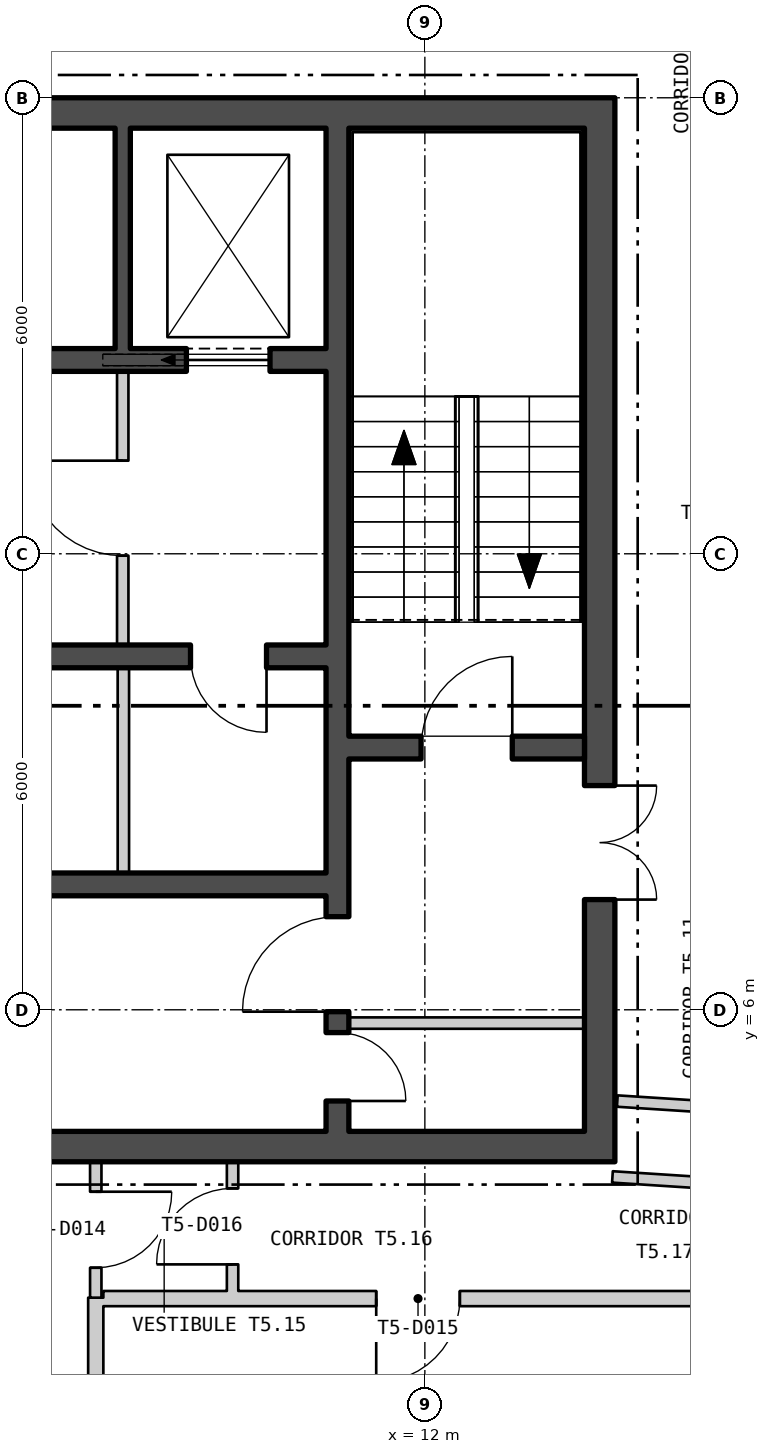
"""IFC4 building model, lengths in metres.
Left out: names, types, materials, properties, quantities, classifications, styles, units other than length and angle.
Written with IfcOpenShell. Run it as: python <this file> out.ifc"""

import sys

from ifc_helpers import new_model, si_unit, direction, frame, frame_2d, origin, place, context, subcontext, project, spatial, polyline, rectangle, outline, extrude, element, fill, save


model = new_model("IFC4")
c1 = context("Model", 3, precision=1e-05, world=origin(), true_north=direction((0.0, 1.0)))
c2 = subcontext(c1, "Body", "Model", "MODEL_VIEW")
j1 = project(units=[si_unit("LENGTHUNIT", "METRE"), si_unit("PLANEANGLEUNIT", "RADIAN")], contexts=[c1])
p1 = place(None, origin())
s1 = spatial("IfcSite", under=j1, at=p1, CompositionType="ELEMENT")
p2 = place(p1, origin())
s2 = spatial("IfcBuilding", under=s1, at=p2, CompositionType="ELEMENT")
p3 = place(p2, frame((0.0, 0.0, 292.2)))
s3 = spatial("IfcBuildingStorey", under=s2, at=p3, CompositionType="ELEMENT", Elevation=292.2)
p4 = place(p3, frame((14.048, -3.663, -0.18), z_axis=(0.0, 0.0, 1.0), x_axis=(0.500002580931, 0.866023913678, 0.0)))
e1 = element("IfcWall", 1, at=p4, inside=s3, PredefinedType="SOLIDWALL", context=c2, shape_type="SweptSolid", body=[
    extrude(outline(polyline([(0.0, -0.225), (22.595, -0.225), (22.335, 0.225), (0.0, 0.225), (0.0, -0.225)])), origin(), (0.0, 0.0, 1.0), 5.9),
])
p5 = place(p4, frame((0.653, 0.0, 1.38)))
e2 = element("IfcOpeningElement", 2, at=p5, cuts=e1, PredefinedType="OPENING", context=c2, shape_type="SweptSolid", body=[
    extrude(rectangle(XDim=2.4, YDim=3.6, at=frame_2d((1.2, 1.8))), frame((0.0, 0.235, 0.0), z_axis=(0.0, -1.0, 0.0), x_axis=(1.0, 0.0, 0.0)), (0.0, 0.0, 1.0), 0.47),
])
p6 = place(p4, frame((5.16, 0.0, 1.38)))
e3 = element("IfcOpeningElement", 3, at=p6, cuts=e1, PredefinedType="OPENING", context=c2, shape_type="SweptSolid", body=[
    extrude(rectangle(XDim=2.4, YDim=3.6, at=frame_2d((1.2, 1.8))), frame((0.0, 0.235, 0.0), z_axis=(0.0, -1.0, 0.0), x_axis=(1.0, 0.0, 0.0)), (0.0, 0.0, 1.0), 0.47),
])
p7 = place(p4, frame((9.667, 0.0, 1.38)))
e4 = element("IfcOpeningElement", 4, at=p7, cuts=e1, PredefinedType="OPENING", context=c2, shape_type="SweptSolid", body=[
    extrude(rectangle(XDim=2.4, YDim=3.6, at=frame_2d((1.2, 1.8))), frame((0.0, 0.235, 0.0), z_axis=(0.0, -1.0, 0.0), x_axis=(1.0, 0.0, 0.0)), (0.0, 0.0, 1.0), 0.47),
])
p8 = place(p4, frame((14.173, 0.0, 1.38)))
e5 = element("IfcOpeningElement", 5, at=p8, cuts=e1, PredefinedType="OPENING", context=c2, shape_type="SweptSolid", body=[
    extrude(rectangle(XDim=2.4, YDim=3.6, at=frame_2d((1.2, 1.8))), frame((0.0, 0.235, 0.0), z_axis=(0.0, -1.0, 0.0), x_axis=(1.0, 0.0, 0.0)), (0.0, 0.0, 1.0), 0.47),
])
p9 = place(p4, frame((18.641, 0.0, 1.38)))
e6 = element("IfcOpeningElement", 6, at=p9, cuts=e1, PredefinedType="OPENING", context=c2, shape_type="SweptSolid", body=[
    extrude(rectangle(XDim=2.4, YDim=3.6, at=frame_2d((1.2, 1.8))), frame((0.0, 0.235, 0.0), z_axis=(0.0, -1.0, 0.0), x_axis=(1.0, 0.0, 0.0)), (0.0, 0.0, 1.0), 0.47),
])
p10 = place(p3, frame((-14.5, 4.2, 0.0), z_axis=(0.0, 0.0, 1.0), x_axis=(1.0, 0.0, 0.0)))
e7 = element("IfcWall", 7, at=p10, inside=s3, PredefinedType="SHEAR", context=c2, shape_type="SweptSolid", body=[
    extrude(rectangle(XDim=29.0, YDim=0.4, at=frame_2d((14.5, 0.0))), origin(), (0.0, 0.0, 1.0), 5.7),
])
p11 = place(p10, frame((9.0, 0.0, 0.0)))
e8 = element("IfcOpeningElement", 8, at=p11, cuts=e7, PredefinedType="OPENING", context=c2, shape_type="SweptSolid", body=[
    extrude(rectangle(XDim=1.8, YDim=2.4, at=frame_2d((0.9, 1.2))), frame((0.0, 0.21, 0.0), z_axis=(0.0, -1.0, 0.0), x_axis=(1.0, 0.0, 0.0)), (0.0, 0.0, 1.0), 0.42),
])
p12 = place(p10, frame((19.0, 0.0, 0.0)))
e9 = element("IfcOpeningElement", 9, at=p12, cuts=e7, PredefinedType="OPENING", context=c2, shape_type="SweptSolid", body=[
    extrude(rectangle(XDim=1.8, YDim=2.4, at=frame_2d((0.9, 1.2))), frame((0.0, 0.21, 0.0), z_axis=(0.0, -1.0, 0.0), x_axis=(1.0, 0.0, 0.0)), (0.0, 0.0, 1.0), 0.42),
])
p13 = place(p3, frame((-14.5, 17.8, 0.0), z_axis=(0.0, 0.0, 1.0), x_axis=(1.0, 0.0, 0.0)))
e10 = element("IfcWall", 10, at=p13, inside=s3, PredefinedType="SHEAR", context=c2, shape_type="SweptSolid", body=[
    extrude(rectangle(XDim=29.0, YDim=0.4, at=frame_2d((14.5, 0.0))), origin(), (0.0, 0.0, 1.0), 5.7),
])
p14 = place(p3, frame((14.3, 4.4, 0.0), z_axis=(0.0, 0.0, 1.0), x_axis=(0.0, 1.0, 0.0)))
e11 = element("IfcWall", 11, at=p14, inside=s3, PredefinedType="SHEAR", context=c2, shape_type="SweptSolid", body=[
    extrude(rectangle(XDim=13.2, YDim=0.4, at=frame_2d((6.6, 0.0))), origin(), (0.0, 0.0, 1.0), 5.7),
])
p15 = place(p14, frame((3.05, 0.0, 0.0)))
e12 = element("IfcOpeningElement", 12, at=p15, cuts=e11, PredefinedType="OPENING", context=c2, shape_type="SweptSolid", body=[
    extrude(rectangle(XDim=1.5, YDim=2.1, at=frame_2d((0.75, 1.05))), frame((0.0, 0.21, 0.0), z_axis=(0.0, -1.0, 0.0), x_axis=(1.0, 0.0, 0.0)), (0.0, 0.0, 1.0), 0.42),
])
p16 = place(p3, frame((10.85, 4.4, 0.0), z_axis=(0.0, 0.0, 1.0), x_axis=(0.0, 1.0, 0.0)))
e13 = element("IfcWall", 13, at=p16, inside=s3, PredefinedType="SHEAR", context=c2, shape_type="SweptSolid", body=[
    extrude(rectangle(XDim=13.2, YDim=0.3, at=frame_2d((6.6, 0.0))), origin(), (0.0, 0.0, 1.0), 5.7),
])
p17 = place(p16, frame((1.575, 0.0, 0.0)))
e14 = element("IfcOpeningElement", 14, at=p17, cuts=e13, PredefinedType="OPENING", context=c2, shape_type="SweptSolid", body=[
    extrude(rectangle(XDim=1.25, YDim=2.1, at=frame_2d((0.625, 1.05))), frame((0.0, 0.16, 0.0), z_axis=(0.0, -1.0, 0.0), x_axis=(1.0, 0.0, 0.0)), (0.0, 0.0, 1.0), 0.32),
])
p18 = place(p16, frame((0.4, 0.0, 0.0)))
e15 = element("IfcOpeningElement", 15, at=p18, cuts=e13, PredefinedType="OPENING", context=c2, shape_type="SweptSolid", body=[
    extrude(rectangle(XDim=0.9, YDim=2.1, at=frame_2d((0.45, 1.05))), frame((0.0, 0.16, 0.0), z_axis=(0.0, -1.0, 0.0), x_axis=(1.0, 0.0, 0.0)), (0.0, 0.0, 1.0), 0.32),
])
p19 = place(p3, frame((11.0, 9.45, 0.0), z_axis=(0.0, 0.0, 1.0), x_axis=(1.0, 0.0, 0.0)))
e16 = element("IfcWall", 16, at=p19, inside=s3, PredefinedType="SHEAR", context=c2, shape_type="SweptSolid", body=[
    extrude(rectangle(XDim=3.1, YDim=0.3, at=frame_2d((1.55, 0.0))), origin(), (0.0, 0.0, 1.0), 5.7),
])
p20 = place(p19, frame((0.95, 0.0, 0.0)))
e17 = element("IfcOpeningElement", 17, at=p20, cuts=e16, PredefinedType="OPENING", context=c2, shape_type="SweptSolid", body=[
    extrude(rectangle(XDim=1.2, YDim=2.1, at=frame_2d((0.6, 1.05))), frame((0.0, 0.16, 0.0), z_axis=(0.0, -1.0, 0.0), x_axis=(1.0, 0.0, 0.0)), (0.0, 0.0, 1.0), 0.32),
])
p21 = place(p3, frame((-10.7, 14.55, 0.0), z_axis=(0.0, 0.0, 1.0), x_axis=(1.0, 0.0, 0.0)))
e18 = element("IfcWall", 18, at=p21, inside=s3, PredefinedType="SHEAR", context=c2, shape_type="SweptSolid", body=[
    extrude(rectangle(XDim=21.4, YDim=0.3, at=frame_2d((10.7, 0.0))), origin(), (0.0, 0.0, 1.0), 5.7),
])
p22 = place(p21, frame((0.738, 0.0, 0.0)))
e19 = element("IfcOpeningElement", 19, at=p22, cuts=e18, PredefinedType="OPENING", context=c2, shape_type="SweptSolid", body=[
    extrude(rectangle(XDim=1.1, YDim=2.1, at=frame_2d((0.55, 1.05))), frame((0.0, 0.16, 0.0), z_axis=(0.0, -1.0, 0.0), x_axis=(1.0, 0.0, 0.0)), (0.0, 0.0, 1.0), 0.32),
])
p23 = place(p21, frame((3.462, 0.0, 0.0)))
e20 = element("IfcOpeningElement", 20, at=p23, cuts=e18, PredefinedType="OPENING", context=c2, shape_type="SweptSolid", body=[
    extrude(rectangle(XDim=1.1, YDim=2.1, at=frame_2d((0.55, 1.05))), frame((0.0, 0.16, 0.0), z_axis=(0.0, -1.0, 0.0), x_axis=(1.0, 0.0, 0.0)), (0.0, 0.0, 1.0), 0.32),
])
p24 = place(p21, frame((6.138, 0.0, 0.0)))
e21 = element("IfcOpeningElement", 21, at=p24, cuts=e18, PredefinedType="OPENING", context=c2, shape_type="SweptSolid", body=[
    extrude(rectangle(XDim=1.1, YDim=2.1, at=frame_2d((0.55, 1.05))), frame((0.0, 0.16, 0.0), z_axis=(0.0, -1.0, 0.0), x_axis=(1.0, 0.0, 0.0)), (0.0, 0.0, 1.0), 0.32),
])
p25 = place(p21, frame((8.812, 0.0, 0.0)))
e22 = element("IfcOpeningElement", 22, at=p25, cuts=e18, PredefinedType="OPENING", context=c2, shape_type="SweptSolid", body=[
    extrude(rectangle(XDim=1.1, YDim=2.1, at=frame_2d((0.55, 1.05))), frame((0.0, 0.16, 0.0), z_axis=(0.0, -1.0, 0.0), x_axis=(1.0, 0.0, 0.0)), (0.0, 0.0, 1.0), 0.32),
])
p26 = place(p21, frame((19.562, 0.0, 0.0)))
e23 = element("IfcOpeningElement", 23, at=p26, cuts=e18, PredefinedType="OPENING", context=c2, shape_type="SweptSolid", body=[
    extrude(rectangle(XDim=1.1, YDim=2.1, at=frame_2d((0.55, 1.05))), frame((0.0, 0.16, 0.0), z_axis=(0.0, -1.0, 0.0), x_axis=(1.0, 0.0, 0.0)), (0.0, 0.0, 1.0), 0.32),
])
p27 = place(p21, frame((11.537, 0.0, 0.0)))
e24 = element("IfcOpeningElement", 24, at=p27, cuts=e18, PredefinedType="OPENING", context=c2, shape_type="SweptSolid", body=[
    extrude(rectangle(XDim=1.0, YDim=2.1, at=frame_2d((0.5, 1.05))), frame((0.0, 0.16, 0.0), z_axis=(0.0, -1.0, 0.0), x_axis=(1.0, 0.0, 0.0)), (0.0, 0.0, 1.0), 0.32),
])
p28 = place(p21, frame((15.55, 0.0, 0.0)))
e25 = element("IfcOpeningElement", 25, at=p28, cuts=e18, PredefinedType="OPENING", context=c2, shape_type="SweptSolid", body=[
    extrude(rectangle(XDim=1.0, YDim=2.1, at=frame_2d((0.5, 1.05))), frame((0.0, 0.16, 0.0), z_axis=(0.0, -1.0, 0.0), x_axis=(1.0, 0.0, 0.0)), (0.0, 0.0, 1.0), 0.32),
])
p29 = place(p3, frame((2.6, 10.65, 0.0), z_axis=(0.0, 0.0, 1.0), x_axis=(1.0, 0.0, 0.0)))
e26 = element("IfcWall", 26, at=p29, inside=s3, PredefinedType="SHEAR", context=c2, shape_type="SweptSolid", body=[
    extrude(rectangle(XDim=8.1, YDim=0.3, at=frame_2d((4.05, 0.0))), origin(), (0.0, 0.0, 1.0), 5.7),
])
p30 = place(p29, frame((2.267, 0.0, 0.0)))
e27 = element("IfcOpeningElement", 27, at=p30, cuts=e26, PredefinedType="OPENING", context=c2, shape_type="SweptSolid", body=[
    extrude(rectangle(XDim=1.0, YDim=2.1, at=frame_2d((0.5, 1.05))), frame((0.0, 0.16, 0.0), z_axis=(0.0, -1.0, 0.0), x_axis=(1.0, 0.0, 0.0)), (0.0, 0.0, 1.0), 0.32),
])
p31 = place(p29, frame((6.317, 0.0, 0.0)))
e28 = element("IfcOpeningElement", 28, at=p31, cuts=e26, PredefinedType="OPENING", context=c2, shape_type="SweptSolid", body=[
    extrude(rectangle(XDim=1.0, YDim=2.1, at=frame_2d((0.5, 1.05))), frame((0.0, 0.16, 0.0), z_axis=(0.0, -1.0, 0.0), x_axis=(1.0, 0.0, 0.0)), (0.0, 0.0, 1.0), 0.32),
])
p32 = place(p3, frame((2.6, 7.65, 0.0), z_axis=(0.0, 0.0, 1.0), x_axis=(1.0, 0.0, 0.0)))
e29 = element("IfcWall", 29, at=p32, inside=s3, PredefinedType="SHEAR", context=c2, shape_type="SweptSolid", body=[
    extrude(rectangle(XDim=8.1, YDim=0.3, at=frame_2d((4.05, 0.0))), origin(), (0.0, 0.0, 1.0), 5.7),
])
p33 = place(p3, frame((8.025, 14.7, 0.0), z_axis=(0.0, 0.0, 1.0), x_axis=(0.0, 1.0, 0.0)))
e30 = element("IfcWall", 30, at=p33, inside=s3, PredefinedType="SHEAR", context=c2, shape_type="SweptSolid", body=[
    extrude(rectangle(XDim=2.9, YDim=0.2, at=frame_2d((1.45, 0.0))), origin(), (0.0, 0.0, 1.0), 5.7),
])
p34 = place(p3, frame((8.033, 7.8, 0.0), z_axis=(0.0, 0.0, 1.0), x_axis=(0.0, 1.0, 0.0)))
e31 = element("IfcWall", 31, at=p34, inside=s3, PredefinedType="PARTITIONING", context=c2, shape_type="SweptSolid", body=[
    extrude(rectangle(XDim=2.7, YDim=0.15, at=frame_2d((1.35, 0.0))), origin(), (0.0, 0.0, 1.0), 5.7),
])
p35 = place(p3, frame((8.025, 10.8, 0.0), z_axis=(0.0, 0.0, 1.0), x_axis=(0.0, 1.0, 0.0)))
e32 = element("IfcWall", 32, at=p35, inside=s3, PredefinedType="PARTITIONING", context=c2, shape_type="SweptSolid", body=[
    extrude(rectangle(XDim=3.6, YDim=0.15, at=frame_2d((1.8, 0.0))), origin(), (0.0, 0.0, 1.0), 5.7),
])
p36 = place(p35, frame((1.175, 0.0, 0.0)))
e33 = element("IfcOpeningElement", 33, at=p36, cuts=e32, PredefinedType="OPENING", context=c2, shape_type="SweptSolid", body=[
    extrude(rectangle(XDim=1.25, YDim=2.1, at=frame_2d((0.625, 1.05))), frame((0.0, 0.085, 0.0), z_axis=(0.0, -1.0, 0.0), x_axis=(1.0, 0.0, 0.0)), (0.0, 0.0, 1.0), 0.17),
])
p37 = place(p3, frame((11.0, 5.825, 0.0), z_axis=(0.0, 0.0, 1.0), x_axis=(1.0, 0.0, 0.0)))
e34 = element("IfcWall", 34, at=p37, inside=s3, PredefinedType="PARTITIONING", context=c2, shape_type="SweptSolid", body=[
    extrude(rectangle(XDim=3.1, YDim=0.15, at=frame_2d((1.55, 0.0))), origin(), (0.0, 0.0, 1.0), 5.7),
])
p38 = place(p3, frame((7.67, -13.7, 0.0), z_axis=(0.0, 0.0, 1.0), x_axis=(0.0, 1.0, 0.0)))
e35 = element("IfcWall", 35, at=p38, inside=s3, PredefinedType="PARTITIONING", context=c2, shape_type="SweptSolid", body=[
    extrude(rectangle(XDim=15.912, YDim=0.2, at=frame_2d((7.956, 0.0))), origin(), (0.0, 0.0, 1.0), 5.7),
])
p39 = place(p38, frame((5.342, 0.0, 0.0)))
e36 = element("IfcOpeningElement", 36, at=p39, cuts=e35, PredefinedType="OPENING", context=c2, shape_type="SweptSolid", body=[
    extrude(rectangle(XDim=1.1, YDim=2.1, at=frame_2d((0.55, 1.05))), frame((0.0, 0.11, 0.0), z_axis=(0.0, -1.0, 0.0), x_axis=(1.0, 0.0, 0.0)), (0.0, 0.0, 1.0), 0.22),
])
p40 = place(p3, frame((7.67, 2.212, 0.0), z_axis=(0.0, 0.0, 1.0), x_axis=(0.0, 1.0, 0.0)))
e37 = element("IfcWall", 37, at=p40, inside=s3, PredefinedType="PARTITIONING", context=c2, shape_type="SweptSolid", body=[
    extrude(rectangle(XDim=1.788, YDim=0.15, at=frame_2d((0.894, 0.0))), origin(), (0.0, 0.0, 1.0), 5.7),
])
p41 = place(p40, frame((0.394, 0.0, 0.0)))
e38 = element("IfcOpeningElement", 38, at=p41, cuts=e37, PredefinedType="OPENING", context=c2, shape_type="SweptSolid", body=[
    extrude(rectangle(XDim=1.0, YDim=2.1, at=frame_2d((0.5, 1.05))), frame((0.0, 0.085, 0.0), z_axis=(0.0, -1.0, 0.0), x_axis=(1.0, 0.0, 0.0)), (0.0, 0.0, 1.0), 0.17),
])
p42 = place(p3, frame((7.77, 2.2, 0.0), z_axis=(0.0, 0.0, 1.0), x_axis=(1.0, 0.0, 0.0)))
e39 = element("IfcWall", 39, at=p42, inside=s3, PredefinedType="PARTITIONING", context=c2, shape_type="SweptSolid", body=[
    extrude(rectangle(XDim=8.63, YDim=0.2, at=frame_2d((4.315, 0.0))), origin(), (0.0, 0.0, 1.0), 5.7),
])
p43 = place(p42, frame((3.59, 0.0, 0.0)))
e40 = element("IfcOpeningElement", 40, at=p43, cuts=e39, PredefinedType="OPENING", context=c2, shape_type="SweptSolid", body=[
    extrude(rectangle(XDim=1.1, YDim=2.1, at=frame_2d((0.55, 1.05))), frame((0.0, 0.11, 0.0), z_axis=(0.0, -1.0, 0.0), x_axis=(1.0, 0.0, 0.0)), (0.0, 0.0, 1.0), 0.22),
])
p44 = place(p3, frame((9.47, 2.3, 0.0), z_axis=(0.0, 0.0, 1.0), x_axis=(0.0, 1.0, 0.0)))
e41 = element("IfcWall", 41, at=p44, inside=s3, PredefinedType="PARTITIONING", context=c2, shape_type="SweptSolid", body=[
    extrude(rectangle(XDim=1.7, YDim=0.15, at=frame_2d((0.85, 0.0))), origin(), (0.0, 0.0, 1.0), 5.25),
])
p45 = place(p44, frame((0.35, 0.0, 0.0)))
e42 = element("IfcOpeningElement", 42, at=p45, cuts=e41, PredefinedType="OPENING", context=c2, shape_type="SweptSolid", body=[
    extrude(rectangle(XDim=1.0, YDim=2.1, at=frame_2d((0.5, 1.05))), frame((0.0, 0.085, 0.0), z_axis=(0.0, -1.0, 0.0), x_axis=(1.0, 0.0, 0.0)), (0.0, 0.0, 1.0), 0.17),
])
p46 = place(p3, frame((14.468, 3.801, 0.0), z_axis=(0.0, 0.0, 1.0), x_axis=(0.997915745008, -0.064530348407, 0.0)))
e43 = element("IfcWall", 43, at=p46, inside=s3, PredefinedType="PARTITIONING", context=c2, shape_type="SweptSolid", body=[
    extrude(rectangle(XDim=1.736, YDim=0.15, at=frame_2d((0.868, 0.0))), origin(), (0.0, 0.0, 1.0), 5.7),
])
p47 = place(p3, frame((14.532, 4.799, 0.0), z_axis=(0.0, 0.0, 1.0), x_axis=(0.997930552357, -0.064300953906, 0.0)))
e44 = element("IfcWall", 44, at=p47, inside=s3, PredefinedType="PARTITIONING", context=c2, shape_type="SweptSolid", body=[
    extrude(rectangle(XDim=1.975, YDim=0.15, at=frame_2d((0.988, 0.0))), origin(), (0.0, 0.0, 1.0), 5.7),
])
p48 = place(p26, origin())
e45 = element("IfcDoor", 45, at=p48, inside=s3, OperationType="SLIDING_TO_LEFT", PredefinedType="DOOR", context=c2, shape_type="SweptSolid", body=[
    extrude(rectangle(XDim=1.1, YDim=2.1, at=frame_2d((0.55, 1.05))), frame((0.0, 0.025, 0.0), z_axis=(0.0, -1.0, 0.0), x_axis=(1.0, 0.0, 0.0)), (0.0, 0.0, 1.0), 0.05),
])
fill(e23, e45)
p49 = place(p31, origin())
e46 = element("IfcDoor", 46, at=p49, inside=s3, OperationType="SINGLE_SWING_RIGHT", PredefinedType="DOOR", context=c2, shape_type="SweptSolid", body=[
    extrude(rectangle(XDim=1.0, YDim=2.1, at=frame_2d((0.5, 1.05))), frame((0.0, 0.025, 0.0), z_axis=(0.0, -1.0, 0.0), x_axis=(1.0, 0.0, 0.0)), (0.0, 0.0, 1.0), 0.05),
])
fill(e28, e46)
p50 = place(p36, origin())
e47 = element("IfcDoor", 47, at=p50, inside=s3, OperationType="SINGLE_SWING_LEFT", PredefinedType="DOOR", context=c2, shape_type="SweptSolid", body=[
    extrude(rectangle(XDim=1.25, YDim=2.1, at=frame_2d((0.625, 1.05))), frame((0.0, 0.025, 0.0), z_axis=(0.0, -1.0, 0.0), x_axis=(1.0, 0.0, 0.0)), (0.0, 0.0, 1.0), 0.05),
])
fill(e33, e47)
p51 = place(p20, origin())
e48 = element("IfcDoor", 48, at=p51, inside=s3, OperationType="SINGLE_SWING_LEFT", PredefinedType="DOOR", context=c2, shape_type="SweptSolid", body=[
    extrude(rectangle(XDim=1.2, YDim=2.1, at=frame_2d((0.6, 1.05))), frame((0.0, 0.025, 0.0), z_axis=(0.0, -1.0, 0.0), x_axis=(1.0, 0.0, 0.0)), (0.0, 0.0, 1.0), 0.05),
])
fill(e17, e48)
p52 = place(p17, origin())
e49 = element("IfcDoor", 49, at=p52, inside=s3, OperationType="SINGLE_SWING_RIGHT", PredefinedType="DOOR", context=c2, shape_type="SweptSolid", body=[
    extrude(rectangle(XDim=1.25, YDim=2.1, at=frame_2d((0.625, 1.05))), frame((0.0, 0.025, 0.0), z_axis=(0.0, -1.0, 0.0), x_axis=(1.0, 0.0, 0.0)), (0.0, 0.0, 1.0), 0.05),
])
fill(e14, e49)
p53 = place(p15, origin())
e50 = element("IfcDoor", 50, at=p53, inside=s3, OperationType="DOUBLE_DOOR_SINGLE_SWING", PredefinedType="DOOR", context=c2, shape_type="SweptSolid", body=[
    extrude(rectangle(XDim=1.5, YDim=2.1, at=frame_2d((0.75, 1.05))), frame((0.0, 0.025, 0.0), z_axis=(0.0, -1.0, 0.0), x_axis=(1.0, 0.0, 0.0)), (0.0, 0.0, 1.0), 0.05),
])
fill(e12, e50)
p54 = place(p18, origin())
e51 = element("IfcDoor", 51, at=p54, inside=s3, OperationType="SINGLE_SWING_LEFT", PredefinedType="DOOR", context=c2, shape_type="SweptSolid", body=[
    extrude(rectangle(XDim=0.9, YDim=2.1, at=frame_2d((0.45, 1.05))), frame((0.0, 0.025, 0.0), z_axis=(0.0, -1.0, 0.0), x_axis=(1.0, 0.0, 0.0)), (0.0, 0.0, 1.0), 0.05),
])
fill(e15, e51)
p55 = place(p41, origin())
e52 = element("IfcDoor", 52, at=p55, inside=s3, OperationType="SINGLE_SWING_RIGHT", PredefinedType="DOOR", context=c2, shape_type="SweptSolid", body=[
    extrude(rectangle(XDim=1.0, YDim=2.1, at=frame_2d((0.5, 1.05))), frame((0.0, 0.025, 0.0), z_axis=(0.0, -1.0, 0.0), x_axis=(1.0, 0.0, 0.0)), (0.0, 0.0, 1.0), 0.05),
])
fill(e38, e52)
p56 = place(p43, origin())
e53 = element("IfcDoor", 53, at=p56, inside=s3, OperationType="SINGLE_SWING_LEFT", PredefinedType="DOOR", context=c2, shape_type="SweptSolid", body=[
    extrude(rectangle(XDim=1.1, YDim=2.1, at=frame_2d((0.55, 1.05))), frame((0.0, 0.025, 0.0), z_axis=(0.0, -1.0, 0.0), x_axis=(1.0, 0.0, 0.0)), (0.0, 0.0, 1.0), 0.05),
])
fill(e40, e53)
p57 = place(p45, origin())
e54 = element("IfcDoor", 54, at=p57, inside=s3, OperationType="SINGLE_SWING_RIGHT", PredefinedType="DOOR", context=c2, shape_type="SweptSolid", body=[
    extrude(rectangle(XDim=1.0, YDim=2.1, at=frame_2d((0.5, 1.05))), frame((0.0, 0.025, 0.0), z_axis=(0.0, -1.0, 0.0), x_axis=(1.0, 0.0, 0.0)), (0.0, 0.0, 1.0), 0.05),
])
fill(e42, e54)
save(model, sys.argv[1])
